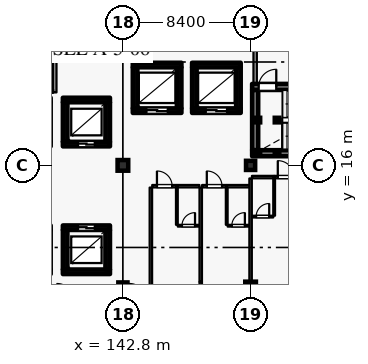
"""IFC4 building model, lengths in metres.
Left out: names, types, materials, properties, quantities, classifications, styles, units other than length and angle.
Written with IfcOpenShell. Run it as: python <this file> out.ifc"""

import sys

from ifc_helpers import new_model, si_unit, direction, frame, frame_2d, origin, origin_2d, place, context, subcontext, project, spatial, rectangle, hollow_rectangle, extrude, element, fill, save


model = new_model("IFC4")
c1 = context("Model", 3, precision=1e-05, world=origin(), true_north=direction((0.0, 1.0)))
c2 = subcontext(c1, "Body", "Model", "MODEL_VIEW")
j1 = project(units=[si_unit("LENGTHUNIT", "METRE"), si_unit("PLANEANGLEUNIT", "RADIAN")], contexts=[c1])
p1 = place(None, origin())
s1 = spatial("IfcSite", under=j1, at=p1, CompositionType="ELEMENT")
p2 = place(p1, origin())
s2 = spatial("IfcBuilding", under=s1, at=p2, CompositionType="ELEMENT")
p3 = place(p2, frame((0.0, 0.0, 36.0)))
s3 = spatial("IfcBuildingStorey", under=s2, at=p3, CompositionType="ELEMENT", Elevation=36.0)
for number, where, z_axis, x_axis in (
    (1, (142.8, 16.0, 0.0), (0.0, 0.0, 1.0), (1.0, 0.0, 0.0)),
    (2, (151.2, 8.0, 0.0), (0.0, 0.0, 1.0), (1.0, 0.0, 0.0)),
):
    element("IfcColumn", number, at=place(p3, frame(where, z_axis=z_axis, x_axis=x_axis)), inside=s3, PredefinedType="COLUMN", context=c2, shape_type="SweptSolid", body=[
        extrude(rectangle(XDim=0.7, YDim=0.7, at=origin_2d()), origin(), (0.0, 0.0, 1.0), 3.6),
    ])
for number, where, z_axis, x_axis in (
    (3, (142.8, 8.0, 0.0), (0.0, 0.0, 1.0), (1.0, 0.0, 0.0)),
    (4, (151.2, 16.0, 0.0), (0.0, 0.0, 1.0), (1.0, 0.0, 0.0)),
):
    element("IfcColumn", number, at=place(p3, frame(where, z_axis=z_axis, x_axis=x_axis)), inside=s3, PredefinedType="COLUMN", context=c2, shape_type="SweptSolid", body=[
        extrude(rectangle(XDim=0.6, YDim=0.6, at=origin_2d()), origin(), (0.0, 0.0, 1.0), 3.6),
    ])
p4 = place(p3, frame((138.85, 17.4, 0.0), z_axis=(0.0, 0.0, 1.0), x_axis=(1.0, 0.0, 0.0)))
e5 = element("IfcWall", 5, at=p4, inside=s3, PredefinedType="SHEAR", context=c2, shape_type="SweptSolid", body=[
    extrude(rectangle(XDim=3.1, YDim=0.3, at=frame_2d((1.55, 0.0))), origin(), (0.0, 0.0, 1.0), 3.365),
])
p5 = place(p4, frame((1.0, 0.0, 0.0)))
e6 = element("IfcOpeningElement", 6, at=p5, cuts=e5, PredefinedType="OPENING", context=c2, shape_type="SweptSolid", body=[
    extrude(rectangle(XDim=1.1, YDim=2.2, at=frame_2d((0.55, 1.1))), frame((0.0, 0.16, 0.0), z_axis=(0.0, -1.0, 0.0), x_axis=(1.0, 0.0, 0.0)), (0.0, 0.0, 1.0), 0.32),
])
p6 = place(p3, frame((141.8, 17.555, 0.0), z_axis=(0.0, 0.0, 1.0), x_axis=(0.0, 1.0, 0.0)))
e7 = element("IfcWall", 7, at=p6, inside=s3, PredefinedType="SHEAR", context=c2, shape_type="SweptSolid", body=[
    extrude(rectangle(XDim=2.59, YDim=0.3, at=frame_2d((1.295, 0.0))), origin(), (0.0, 0.0, 1.0), 3.365),
])
p7 = place(p3, frame((141.95, 20.3, 0.0), z_axis=(0.0, 0.0, 1.0), x_axis=(-1.0, 0.0, 0.0)))
e8 = element("IfcWall", 8, at=p7, inside=s3, PredefinedType="SHEAR", context=c2, shape_type="SweptSolid", body=[
    extrude(rectangle(XDim=3.1, YDim=0.3, at=frame_2d((1.55, 0.0))), origin(), (0.0, 0.0, 1.0), 3.365),
])
p8 = place(p3, frame((139.0, 20.145, 0.0), z_axis=(0.0, 0.0, 1.0), x_axis=(0.0, -1.0, 0.0)))
e9 = element("IfcWall", 9, at=p8, inside=s3, PredefinedType="SHEAR", context=c2, shape_type="SweptSolid", body=[
    extrude(rectangle(XDim=2.59, YDim=0.3, at=frame_2d((1.295, 0.0))), origin(), (0.0, 0.0, 1.0), 3.365),
])
p9 = place(p3, frame((138.85, 9.0, 0.0), z_axis=(0.0, 0.0, 1.0), x_axis=(1.0, 0.0, 0.0)))
e10 = element("IfcWall", 10, at=p9, inside=s3, PredefinedType="SHEAR", context=c2, shape_type="SweptSolid", body=[
    extrude(rectangle(XDim=3.1, YDim=0.3, at=frame_2d((1.55, 0.0))), origin(), (0.0, 0.0, 1.0), 3.365),
])
p10 = place(p3, frame((141.8, 9.155, 0.0), z_axis=(0.0, 0.0, 1.0), x_axis=(0.0, 1.0, 0.0)))
e11 = element("IfcWall", 11, at=p10, inside=s3, PredefinedType="SHEAR", context=c2, shape_type="SweptSolid", body=[
    extrude(rectangle(XDim=2.59, YDim=0.3, at=frame_2d((1.295, 0.0))), origin(), (0.0, 0.0, 1.0), 3.365),
])
p11 = place(p3, frame((141.95, 11.9, 0.0), z_axis=(0.0, 0.0, 1.0), x_axis=(-1.0, 0.0, 0.0)))
e12 = element("IfcWall", 12, at=p11, inside=s3, PredefinedType="SHEAR", context=c2, shape_type="SweptSolid", body=[
    extrude(rectangle(XDim=3.1, YDim=0.3, at=frame_2d((1.55, 0.0))), origin(), (0.0, 0.0, 1.0), 3.365),
])
p12 = place(p11, frame((1.0, 0.0, 0.0)))
e13 = element("IfcOpeningElement", 13, at=p12, cuts=e12, PredefinedType="OPENING", context=c2, shape_type="SweptSolid", body=[
    extrude(rectangle(XDim=1.1, YDim=2.2, at=frame_2d((0.55, 1.1))), frame((0.0, 0.16, 0.0), z_axis=(0.0, -1.0, 0.0), x_axis=(1.0, 0.0, 0.0)), (0.0, 0.0, 1.0), 0.32),
])
p13 = place(p3, frame((139.0, 11.745, 0.0), z_axis=(0.0, 0.0, 1.0), x_axis=(0.0, -1.0, 0.0)))
e14 = element("IfcWall", 14, at=p13, inside=s3, PredefinedType="SHEAR", context=c2, shape_type="SweptSolid", body=[
    extrude(rectangle(XDim=2.59, YDim=0.3, at=frame_2d((1.295, 0.0))), origin(), (0.0, 0.0, 1.0), 3.365),
])
p14 = place(p3, frame((143.45, 19.6, 0.0), z_axis=(0.0, 0.0, 1.0), x_axis=(1.0, 0.0, 0.0)))
e15 = element("IfcWall", 15, at=p14, inside=s3, PredefinedType="SHEAR", context=c2, shape_type="SweptSolid", body=[
    extrude(rectangle(XDim=3.2, YDim=0.3, at=frame_2d((1.6, 0.0))), origin(), (0.0, 0.0, 1.0), 3.365),
])
p15 = place(p14, frame((0.9, 0.0, 0.0)))
e16 = element("IfcOpeningElement", 16, at=p15, cuts=e15, PredefinedType="OPENING", context=c2, shape_type="SweptSolid", body=[
    extrude(rectangle(XDim=1.4, YDim=2.35, at=frame_2d((0.7, 1.175))), frame((0.0, 0.16, 0.0), z_axis=(0.0, -1.0, 0.0), x_axis=(1.0, 0.0, 0.0)), (0.0, 0.0, 1.0), 0.32),
])
p16 = place(p3, frame((146.5, 19.755, 0.0), z_axis=(0.0, 0.0, 1.0), x_axis=(0.0, 1.0, 0.0)))
e17 = element("IfcWall", 17, at=p16, inside=s3, PredefinedType="SHEAR", context=c2, shape_type="SweptSolid", body=[
    extrude(rectangle(XDim=2.69, YDim=0.3, at=frame_2d((1.345, 0.0))), origin(), (0.0, 0.0, 1.0), 3.365),
])
p17 = place(p3, frame((146.65, 22.6, 0.0), z_axis=(0.0, 0.0, 1.0), x_axis=(-1.0, 0.0, 0.0)))
e18 = element("IfcWall", 18, at=p17, inside=s3, PredefinedType="SHEAR", context=c2, shape_type="SweptSolid", body=[
    extrude(rectangle(XDim=3.2, YDim=0.3, at=frame_2d((1.6, 0.0))), origin(), (0.0, 0.0, 1.0), 3.365),
])
p18 = place(p3, frame((143.6, 22.445, 0.0), z_axis=(0.0, 0.0, 1.0), x_axis=(0.0, -1.0, 0.0)))
e19 = element("IfcWall", 19, at=p18, inside=s3, PredefinedType="SHEAR", context=c2, shape_type="SweptSolid", body=[
    extrude(rectangle(XDim=2.69, YDim=0.3, at=frame_2d((1.345, 0.0))), origin(), (0.0, 0.0, 1.0), 3.365),
])
p19 = place(p3, frame((147.35, 19.6, 0.0), z_axis=(0.0, 0.0, 1.0), x_axis=(1.0, 0.0, 0.0)))
e20 = element("IfcWall", 20, at=p19, inside=s3, PredefinedType="SHEAR", context=c2, shape_type="SweptSolid", body=[
    extrude(rectangle(XDim=3.2, YDim=0.3, at=frame_2d((1.6, 0.0))), origin(), (0.0, 0.0, 1.0), 3.365),
])
p20 = place(p19, frame((0.9, 0.0, 0.0)))
e21 = element("IfcOpeningElement", 21, at=p20, cuts=e20, PredefinedType="OPENING", context=c2, shape_type="SweptSolid", body=[
    extrude(rectangle(XDim=1.4, YDim=2.35, at=frame_2d((0.7, 1.175))), frame((0.0, 0.16, 0.0), z_axis=(0.0, -1.0, 0.0), x_axis=(1.0, 0.0, 0.0)), (0.0, 0.0, 1.0), 0.32),
])
p21 = place(p3, frame((150.4, 19.755, 0.0), z_axis=(0.0, 0.0, 1.0), x_axis=(0.0, 1.0, 0.0)))
e22 = element("IfcWall", 22, at=p21, inside=s3, PredefinedType="SHEAR", context=c2, shape_type="SweptSolid", body=[
    extrude(rectangle(XDim=2.69, YDim=0.3, at=frame_2d((1.345, 0.0))), origin(), (0.0, 0.0, 1.0), 3.365),
])
p22 = place(p3, frame((150.55, 22.6, 0.0), z_axis=(0.0, 0.0, 1.0), x_axis=(-1.0, 0.0, 0.0)))
e23 = element("IfcWall", 23, at=p22, inside=s3, PredefinedType="SHEAR", context=c2, shape_type="SweptSolid", body=[
    extrude(rectangle(XDim=3.2, YDim=0.3, at=frame_2d((1.6, 0.0))), origin(), (0.0, 0.0, 1.0), 3.365),
])
p23 = place(p3, frame((147.5, 22.445, 0.0), z_axis=(0.0, 0.0, 1.0), x_axis=(0.0, -1.0, 0.0)))
e24 = element("IfcWall", 24, at=p23, inside=s3, PredefinedType="SHEAR", context=c2, shape_type="SweptSolid", body=[
    extrude(rectangle(XDim=2.69, YDim=0.3, at=frame_2d((1.345, 0.0))), origin(), (0.0, 0.0, 1.0), 3.365),
])
p24 = place(p3, frame((151.3, 16.8, 0.0), z_axis=(0.0, 0.0, 1.0), x_axis=(1.0, 0.0, 0.0)))
e25 = element("IfcWall", 25, at=p24, inside=s3, PredefinedType="SHEAR", context=c2, shape_type="SweptSolid", body=[
    extrude(rectangle(XDim=8.2, YDim=0.4, at=frame_2d((4.1, 0.0))), origin(), (0.0, 0.0, 1.0), 3.365),
])
p25 = place(p3, frame((151.3, 21.16, 0.0), z_axis=(0.0, 0.0, 1.0), x_axis=(1.0, 0.0, 0.0)))
e26 = element("IfcWall", 26, at=p25, inside=s3, PredefinedType="SHEAR", context=c2, shape_type="SweptSolid", body=[
    extrude(rectangle(XDim=8.2, YDim=0.4, at=frame_2d((4.1, 0.0))), origin(), (0.0, 0.0, 1.0), 3.365),
])
p26 = place(p25, frame((0.43, 0.0, 0.0)))
e27 = element("IfcOpeningElement", 27, at=p26, cuts=e26, PredefinedType="OPENING", context=c2, shape_type="SweptSolid", body=[
    extrude(rectangle(XDim=1.16, YDim=2.2, at=frame_2d((0.58, 1.1))), frame((0.0, 0.21, 0.0), z_axis=(0.0, -1.0, 0.0), x_axis=(1.0, 0.0, 0.0)), (0.0, 0.0, 1.0), 0.42),
])
p27 = place(p3, frame((151.5, 17.005, 0.0), z_axis=(0.0, 0.0, 1.0), x_axis=(0.0, 1.0, 0.0)))
e28 = element("IfcWall", 28, at=p27, inside=s3, PredefinedType="SHEAR", context=c2, shape_type="SweptSolid", body=[
    extrude(rectangle(XDim=3.95, YDim=0.4, at=frame_2d((1.975, 0.0))), origin(), (0.0, 0.0, 1.0), 3.365),
])
p28 = place(p3, frame((151.5, 21.365, 0.0), z_axis=(0.0, 0.0, 1.0), x_axis=(0.0, 1.0, 0.0)))
e29 = element("IfcWall", 29, at=p28, inside=s3, PredefinedType="PARTITIONING", context=c2, shape_type="SweptSolid", body=[
    extrude(rectangle(XDim=5.82, YDim=0.22, at=frame_2d((2.91, 0.0))), origin(), (0.0, 0.0, 1.0), 3.365),
])
for number, where, z_axis, x_axis in (
    (30, (151.68, 16.8, 0.0), (0.0, 0.0, 1.0), (1.0, 0.0, 0.0)),
    (31, (151.68, 18.98, 0.0), (0.0, 0.0, 1.0), (1.0, 0.0, 0.0)),
    (32, (152.94, 16.8, 0.0), (0.0, 0.0, 1.0), (1.0, 0.0, 0.0)),
    (33, (152.94, 18.98, 0.0), (0.0, 0.0, 1.0), (1.0, 0.0, 0.0)),
):
    element("IfcColumn", number, at=place(p3, frame(where, z_axis=z_axis, x_axis=x_axis)), inside=s3, PredefinedType="COLUMN", context=c2, shape_type="SweptSolid", body=[
        extrude(hollow_rectangle(XDim=0.3, YDim=0.3, WallThickness=0.012, at=origin_2d()), origin(), (0.0, 0.0, 1.0), 3.42),
    ])
p29 = place(p3, frame((144.73, 14.63, 0.0), z_axis=(0.0, 0.0, 1.0), x_axis=(1.0, 0.0, 0.0)))
e34 = element("IfcWall", 34, at=p29, inside=s3, PredefinedType="PARTITIONING", context=c2, shape_type="SweptSolid", body=[
    extrude(rectangle(XDim=1.62, YDim=0.16, at=frame_2d((0.81, 0.0))), origin(), (0.0, 0.0, 1.0), 3.365),
])
p30 = place(p29, frame((0.31, 0.0, 0.0)))
e35 = element("IfcOpeningElement", 35, at=p30, cuts=e34, PredefinedType="OPENING", context=c2, shape_type="SweptSolid", body=[
    extrude(rectangle(XDim=1.0, YDim=2.25, at=frame_2d((0.5, 1.125))), frame((0.0, 0.09, 0.0), z_axis=(0.0, -1.0, 0.0), x_axis=(1.0, 0.0, 0.0)), (0.0, 0.0, 1.0), 0.18),
])
p31 = place(p3, frame((146.36, 14.63, 0.0), z_axis=(0.0, 0.0, 1.0), x_axis=(1.0, 0.0, 0.0)))
e36 = element("IfcWall", 36, at=p31, inside=s3, PredefinedType="PARTITIONING", context=c2, shape_type="SweptSolid", body=[
    extrude(rectangle(XDim=1.47, YDim=0.16, at=frame_2d((0.735, 0.0))), origin(), (0.0, 0.0, 1.0), 3.365),
])
p32 = place(p3, frame((146.35, 12.09, 0.0), z_axis=(0.0, 0.0, 1.0), x_axis=(0.0, 1.0, 0.0)))
e37 = element("IfcWall", 37, at=p32, inside=s3, PredefinedType="PARTITIONING", context=c2, shape_type="SweptSolid", body=[
    extrude(rectangle(XDim=2.45, YDim=0.115, at=frame_2d((1.225, 0.0))), origin(), (0.0, 0.0, 1.0), 3.365),
])
p33 = place(p3, frame((146.41, 12.03, 0.0), z_axis=(0.0, 0.0, 1.0), x_axis=(1.0, 0.0, 0.0)))
e38 = element("IfcWall", 38, at=p33, inside=s3, PredefinedType="PARTITIONING", context=c2, shape_type="SweptSolid", body=[
    extrude(rectangle(XDim=1.41, YDim=0.115, at=frame_2d((0.705, 0.0))), origin(), (0.0, 0.0, 1.0), 3.365),
])
p34 = place(p33, frame((0.275, 0.0, 0.0)))
e39 = element("IfcOpeningElement", 39, at=p34, cuts=e38, PredefinedType="OPENING", context=c2, shape_type="SweptSolid", body=[
    extrude(rectangle(XDim=0.86, YDim=2.12, at=frame_2d((0.43, 1.06))), frame((0.0, 0.067, 0.0), z_axis=(0.0, -1.0, 0.0), x_axis=(1.0, 0.0, 0.0)), (0.0, 0.0, 1.0), 0.135),
])
p35 = place(p3, frame((144.64, 5.22, 0.0), z_axis=(0.0, 0.0, 1.0), x_axis=(0.0, 1.0, 0.0)))
e40 = element("IfcWall", 40, at=p35, inside=s3, PredefinedType="PARTITIONING", context=c2, shape_type="SweptSolid", body=[
    extrude(rectangle(XDim=9.32, YDim=0.16, at=frame_2d((4.66, 0.0))), origin(), (0.0, 0.0, 1.0), 3.365),
])
p36 = place(p3, frame((147.92, 5.22, 0.0), z_axis=(0.0, 0.0, 1.0), x_axis=(0.0, 1.0, 0.0)))
e41 = element("IfcWall", 41, at=p36, inside=s3, PredefinedType="PARTITIONING", context=c2, shape_type="SweptSolid", body=[
    extrude(rectangle(XDim=3.11, YDim=0.16, at=frame_2d((1.555, 0.0))), origin(), (0.0, 0.0, 1.0), 3.365),
])
p37 = place(p3, frame((148.01, 14.63, 0.0), z_axis=(0.0, 0.0, 1.0), x_axis=(1.0, 0.0, 0.0)))
e42 = element("IfcWall", 42, at=p37, inside=s3, PredefinedType="PARTITIONING", context=c2, shape_type="SweptSolid", body=[
    extrude(rectangle(XDim=1.62, YDim=0.16, at=frame_2d((0.81, 0.0))), origin(), (0.0, 0.0, 1.0), 3.365),
])
p38 = place(p37, frame((0.31, 0.0, 0.0)))
e43 = element("IfcOpeningElement", 43, at=p38, cuts=e42, PredefinedType="OPENING", context=c2, shape_type="SweptSolid", body=[
    extrude(rectangle(XDim=1.0, YDim=2.25, at=frame_2d((0.5, 1.125))), frame((0.0, 0.09, 0.0), z_axis=(0.0, -1.0, 0.0), x_axis=(1.0, 0.0, 0.0)), (0.0, 0.0, 1.0), 0.18),
])
p39 = place(p3, frame((149.64, 14.63, 0.0), z_axis=(0.0, 0.0, 1.0), x_axis=(1.0, 0.0, 0.0)))
e44 = element("IfcWall", 44, at=p39, inside=s3, PredefinedType="PARTITIONING", context=c2, shape_type="SweptSolid", body=[
    extrude(rectangle(XDim=1.47, YDim=0.16, at=frame_2d((0.735, 0.0))), origin(), (0.0, 0.0, 1.0), 3.365),
])
p40 = place(p3, frame((149.63, 12.09, 0.0), z_axis=(0.0, 0.0, 1.0), x_axis=(0.0, 1.0, 0.0)))
e45 = element("IfcWall", 45, at=p40, inside=s3, PredefinedType="PARTITIONING", context=c2, shape_type="SweptSolid", body=[
    extrude(rectangle(XDim=2.45, YDim=0.115, at=frame_2d((1.225, 0.0))), origin(), (0.0, 0.0, 1.0), 3.365),
])
p41 = place(p3, frame((149.69, 12.03, 0.0), z_axis=(0.0, 0.0, 1.0), x_axis=(1.0, 0.0, 0.0)))
e46 = element("IfcWall", 46, at=p41, inside=s3, PredefinedType="PARTITIONING", context=c2, shape_type="SweptSolid", body=[
    extrude(rectangle(XDim=1.41, YDim=0.115, at=frame_2d((0.705, 0.0))), origin(), (0.0, 0.0, 1.0), 3.365),
])
p42 = place(p41, frame((0.275, 0.0, 0.0)))
e47 = element("IfcOpeningElement", 47, at=p42, cuts=e46, PredefinedType="OPENING", context=c2, shape_type="SweptSolid", body=[
    extrude(rectangle(XDim=0.86, YDim=2.12, at=frame_2d((0.43, 1.06))), frame((0.0, 0.067, 0.0), z_axis=(0.0, -1.0, 0.0), x_axis=(1.0, 0.0, 0.0)), (0.0, 0.0, 1.0), 0.135),
])
p43 = place(p3, frame((147.92, 8.34, 0.0), z_axis=(0.0, 0.0, 1.0), x_axis=(0.0, 1.0, 0.0)))
e48 = element("IfcWall", 48, at=p43, inside=s3, PredefinedType="PARTITIONING", context=c2, shape_type="SweptSolid", body=[
    extrude(rectangle(XDim=6.2, YDim=0.16, at=frame_2d((3.1, 0.0))), origin(), (0.0, 0.0, 1.0), 3.365),
])
p44 = place(p3, frame((151.29, 15.23, 0.0), z_axis=(0.0, 0.0, 1.0), x_axis=(1.0, 0.0, 0.0)))
e49 = element("IfcWall", 49, at=p44, inside=s3, PredefinedType="PARTITIONING", context=c2, shape_type="SweptSolid", body=[
    extrude(rectangle(XDim=1.45, YDim=0.16, at=frame_2d((0.725, 0.0))), origin(), (0.0, 0.0, 1.0), 3.365),
])
p45 = place(p3, frame((152.75, 15.23, 0.0), z_axis=(0.0, 0.0, 1.0), x_axis=(1.0, 0.0, 0.0)))
e50 = element("IfcWall", 50, at=p45, inside=s3, PredefinedType="PARTITIONING", context=c2, shape_type="SweptSolid", body=[
    extrude(rectangle(XDim=1.56, YDim=0.16, at=frame_2d((0.78, 0.0))), origin(), (0.0, 0.0, 1.0), 3.365),
])
p46 = place(p45, frame((0.24, 0.0, 0.0)))
e51 = element("IfcOpeningElement", 51, at=p46, cuts=e50, PredefinedType="OPENING", context=c2, shape_type="SweptSolid", body=[
    extrude(rectangle(XDim=1.08, YDim=2.3, at=frame_2d((0.54, 1.15))), frame((0.0, 0.09, 0.0), z_axis=(0.0, -1.0, 0.0), x_axis=(1.0, 0.0, 0.0)), (0.0, 0.0, 1.0), 0.18),
])
p47 = place(p3, frame((152.75, 12.69, 0.0), z_axis=(0.0, 0.0, 1.0), x_axis=(0.0, 1.0, 0.0)))
e52 = element("IfcWall", 52, at=p47, inside=s3, PredefinedType="PARTITIONING", context=c2, shape_type="SweptSolid", body=[
    extrude(rectangle(XDim=2.45, YDim=0.115, at=frame_2d((1.225, 0.0))), origin(), (0.0, 0.0, 1.0), 3.365),
])
p48 = place(p3, frame((151.3, 12.63, 0.0), z_axis=(0.0, 0.0, 1.0), x_axis=(1.0, 0.0, 0.0)))
e53 = element("IfcWall", 53, at=p48, inside=s3, PredefinedType="PARTITIONING", context=c2, shape_type="SweptSolid", body=[
    extrude(rectangle(XDim=1.39, YDim=0.115, at=frame_2d((0.695, 0.0))), origin(), (0.0, 0.0, 1.0), 3.365),
])
p49 = place(p48, frame((0.265, 0.0, 0.0)))
e54 = element("IfcOpeningElement", 54, at=p49, cuts=e53, PredefinedType="OPENING", context=c2, shape_type="SweptSolid", body=[
    extrude(rectangle(XDim=0.86, YDim=2.12, at=frame_2d((0.43, 1.06))), frame((0.0, 0.067, 0.0), z_axis=(0.0, -1.0, 0.0), x_axis=(1.0, 0.0, 0.0)), (0.0, 0.0, 1.0), 0.135),
])
p50 = place(p3, frame((151.2, 8.34, 0.0), z_axis=(0.0, 0.0, 1.0), x_axis=(0.0, 1.0, 0.0)))
e55 = element("IfcWall", 55, at=p50, inside=s3, PredefinedType="PARTITIONING", context=c2, shape_type="SweptSolid", body=[
    extrude(rectangle(XDim=6.8, YDim=0.16, at=frame_2d((3.4, 0.0))), origin(), (0.0, 0.0, 1.0), 2.74),
])
p51 = place(p3, frame((138.32, 20.8, 0.0), z_axis=(0.0, 0.0, 1.0), x_axis=(0.0, 1.0, 0.0)))
e56 = element("IfcWall", 56, at=p51, inside=s3, PredefinedType="PARTITIONING", context=c2, shape_type="SweptSolid", body=[
    extrude(rectangle(XDim=2.748, YDim=0.22, at=frame_2d((1.374, 0.0))), origin(), (0.0, 0.0, 1.0), 3.365),
])
p52 = place(p3, frame((135.39, 20.88, 0.0), z_axis=(0.0, 0.0, 1.0), x_axis=(1.0, 0.0, 0.0)))
e57 = element("IfcWall", 57, at=p52, inside=s3, PredefinedType="PARTITIONING", context=c2, shape_type="SweptSolid", body=[
    extrude(rectangle(XDim=2.82, YDim=0.22, at=frame_2d((1.41, 0.0))), origin(), (0.0, 0.0, 1.0), 3.365),
])
p53 = place(p5, origin())
e58 = element("IfcDoor", 58, at=p53, inside=s3, OperationType="DOUBLE_DOOR_SLIDING", PredefinedType="DOOR", context=c2, shape_type="SweptSolid", body=[
    extrude(rectangle(XDim=1.1, YDim=2.2, at=frame_2d((0.55, 1.1))), frame((0.0, 0.025, 0.0), z_axis=(0.0, -1.0, 0.0), x_axis=(1.0, 0.0, 0.0)), (0.0, 0.0, 1.0), 0.05),
])
fill(e6, e58)
p54 = place(p12, origin())
e59 = element("IfcDoor", 59, at=p54, inside=s3, OperationType="DOUBLE_DOOR_SLIDING", PredefinedType="DOOR", context=c2, shape_type="SweptSolid", body=[
    extrude(rectangle(XDim=1.1, YDim=2.2, at=frame_2d((0.55, 1.1))), frame((0.0, 0.025, 0.0), z_axis=(0.0, -1.0, 0.0), x_axis=(1.0, 0.0, 0.0)), (0.0, 0.0, 1.0), 0.05),
])
fill(e13, e59)
p55 = place(p15, origin())
e60 = element("IfcDoor", 60, at=p55, inside=s3, OperationType="DOUBLE_DOOR_SLIDING", PredefinedType="DOOR", context=c2, shape_type="SweptSolid", body=[
    extrude(rectangle(XDim=1.4, YDim=2.35, at=frame_2d((0.7, 1.175))), frame((0.0, 0.025, 0.0), z_axis=(0.0, -1.0, 0.0), x_axis=(1.0, 0.0, 0.0)), (0.0, 0.0, 1.0), 0.05),
])
fill(e16, e60)
p56 = place(p20, origin())
e61 = element("IfcDoor", 61, at=p56, inside=s3, OperationType="DOUBLE_DOOR_SLIDING", PredefinedType="DOOR", context=c2, shape_type="SweptSolid", body=[
    extrude(rectangle(XDim=1.4, YDim=2.35, at=frame_2d((0.7, 1.175))), frame((0.0, 0.025, 0.0), z_axis=(0.0, -1.0, 0.0), x_axis=(1.0, 0.0, 0.0)), (0.0, 0.0, 1.0), 0.05),
])
fill(e21, e61)
p57 = place(p26, origin())
e62 = element("IfcDoor", 62, at=p57, inside=s3, OperationType="SINGLE_SWING_RIGHT", PredefinedType="DOOR", context=c2, shape_type="SweptSolid", body=[
    extrude(rectangle(XDim=1.16, YDim=2.2, at=frame_2d((0.58, 1.1))), frame((0.0, 0.025, 0.0), z_axis=(0.0, -1.0, 0.0), x_axis=(1.0, 0.0, 0.0)), (0.0, 0.0, 1.0), 0.05),
])
fill(e27, e62)
p58 = place(p30, origin())
e63 = element("IfcDoor", 63, at=p58, inside=s3, OperationType="SINGLE_SWING_LEFT", PredefinedType="DOOR", context=c2, shape_type="SweptSolid", body=[
    extrude(rectangle(XDim=1.0, YDim=2.25, at=frame_2d((0.5, 1.125))), frame((0.0, 0.025, 0.0), z_axis=(0.0, -1.0, 0.0), x_axis=(1.0, 0.0, 0.0)), (0.0, 0.0, 1.0), 0.05),
])
fill(e35, e63)
p59 = place(p34, origin())
e64 = element("IfcDoor", 64, at=p59, inside=s3, OperationType="SINGLE_SWING_RIGHT", PredefinedType="DOOR", context=c2, shape_type="SweptSolid", body=[
    extrude(rectangle(XDim=0.86, YDim=2.12, at=frame_2d((0.43, 1.06))), frame((0.0, 0.025, 0.0), z_axis=(0.0, -1.0, 0.0), x_axis=(1.0, 0.0, 0.0)), (0.0, 0.0, 1.0), 0.05),
])
fill(e39, e64)
p60 = place(p38, origin())
e65 = element("IfcDoor", 65, at=p60, inside=s3, OperationType="SINGLE_SWING_LEFT", PredefinedType="DOOR", context=c2, shape_type="SweptSolid", body=[
    extrude(rectangle(XDim=1.0, YDim=2.25, at=frame_2d((0.5, 1.125))), frame((0.0, 0.025, 0.0), z_axis=(0.0, -1.0, 0.0), x_axis=(1.0, 0.0, 0.0)), (0.0, 0.0, 1.0), 0.05),
])
fill(e43, e65)
p61 = place(p42, origin())
e66 = element("IfcDoor", 66, at=p61, inside=s3, OperationType="SINGLE_SWING_RIGHT", PredefinedType="DOOR", context=c2, shape_type="SweptSolid", body=[
    extrude(rectangle(XDim=0.86, YDim=2.12, at=frame_2d((0.43, 1.06))), frame((0.0, 0.025, 0.0), z_axis=(0.0, -1.0, 0.0), x_axis=(1.0, 0.0, 0.0)), (0.0, 0.0, 1.0), 0.05),
])
fill(e47, e66)
p62 = place(p46, origin())
e67 = element("IfcDoor", 67, at=p62, inside=s3, OperationType="SINGLE_SWING_LEFT", PredefinedType="DOOR", context=c2, shape_type="SweptSolid", body=[
    extrude(rectangle(XDim=1.08, YDim=2.3, at=frame_2d((0.54, 1.15))), frame((0.0, 0.025, 0.0), z_axis=(0.0, -1.0, 0.0), x_axis=(1.0, 0.0, 0.0)), (0.0, 0.0, 1.0), 0.05),
])
fill(e51, e67)
p63 = place(p49, origin())
e68 = element("IfcDoor", 68, at=p63, inside=s3, OperationType="SINGLE_SWING_RIGHT", PredefinedType="DOOR", context=c2, shape_type="SweptSolid", body=[
    extrude(rectangle(XDim=0.86, YDim=2.12, at=frame_2d((0.43, 1.06))), frame((0.0, 0.025, 0.0), z_axis=(0.0, -1.0, 0.0), x_axis=(1.0, 0.0, 0.0)), (0.0, 0.0, 1.0), 0.05),
])
fill(e54, e68)
save(model, sys.argv[1])
